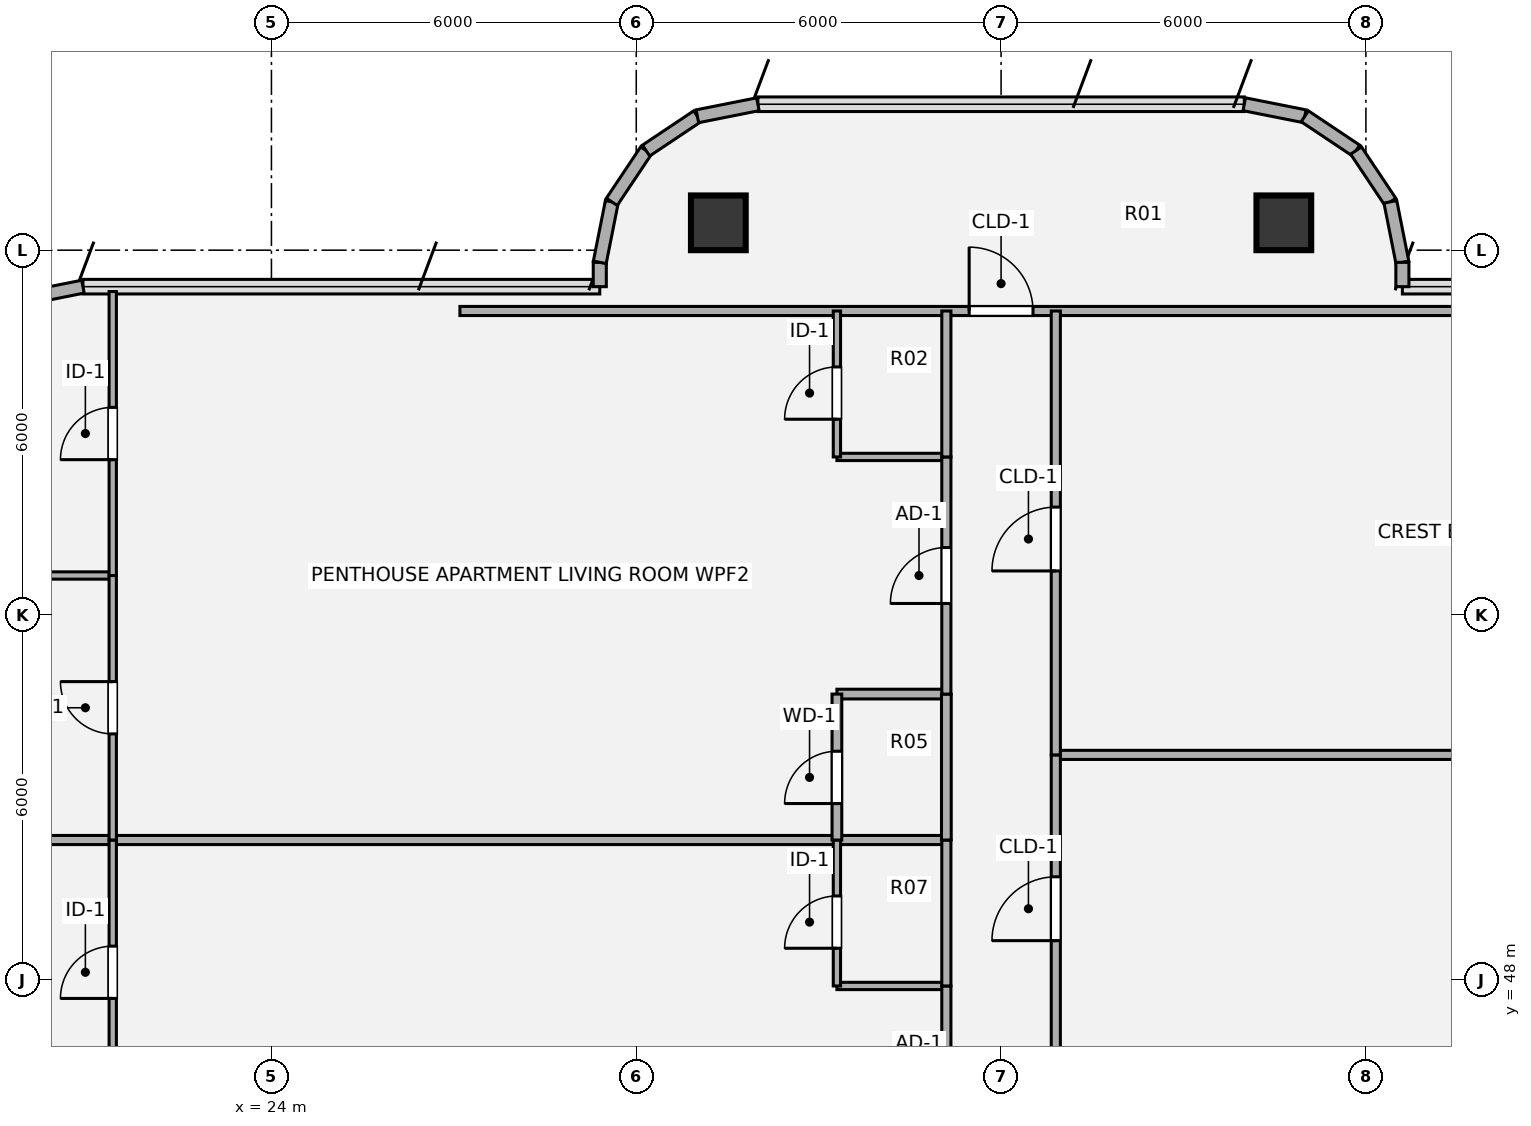
"""IFC4 building model, lengths in metres.
Left out: names, types, materials, properties, quantities, classifications, styles, units other than length and angle.
Written with IfcOpenShell. Run it as: python <this file> out.ifc"""

import sys

from ifc_helpers import new_model, si_unit, direction, frame, frame_2d, origin, origin_2d, place, context, subcontext, project, spatial, rectangle, hollow_circle, extrude, source, transform, mapped, element, fill, save


model = new_model("IFC4")
c1 = context("Model", 3, precision=1e-05, world=origin(), true_north=direction((0.0, 1.0)))
c2 = subcontext(c1, "Body", "Model", "MODEL_VIEW")
j1 = project(units=[si_unit("LENGTHUNIT", "METRE"), si_unit("PLANEANGLEUNIT", "RADIAN")], contexts=[c1])
p1 = place(None, origin())
s1 = spatial("IfcSite", under=j1, at=p1, CompositionType="ELEMENT")
p2 = place(p1, origin())
s2 = spatial("IfcBuilding", under=s1, at=p2, CompositionType="ELEMENT")
p3 = place(p2, frame((0.0, 0.0, 283.5)))
s3 = spatial("IfcBuildingStorey", under=s2, at=p3, CompositionType="ELEMENT", Elevation=283.5)
m1 = source(origin(), c2, "Body", "SweptSolid", [
    extrude(hollow_circle(Radius=0.45, WallThickness=0.032, at=origin_2d()), origin(), (0.0, 0.0, 1.0), 3.78),
])
for number, where, z_axis, x_axis in (
    (1, (31.35, 60.45, 0.0), (0.0, 0.0, 1.0), (1.0, 0.0, 0.0)),
    (2, (40.65, 60.45, 0.0), (0.0, 0.0, 1.0), (1.0, 0.0, 0.0)),
):
    element("IfcColumn", number, at=place(p3, frame(where, z_axis=z_axis, x_axis=x_axis)), inside=s3, PredefinedType="COLUMN", context=c2, shape_type="MappedRepresentation", body=[
        mapped(m1, transform((0.0, 0.0, 0.0), x_axis=(1.0, 0.0, 0.0), y_axis=(0.0, 1.0, 0.0), z_axis=(0.0, 0.0, 1.0), scale=1.0)),
    ])
p4 = place(p3, frame((19.675, 59.156, 0.0), z_axis=(0.0, 0.0, 1.0), x_axis=(0.980813122964, 0.194950295773, 0.0)))
e3 = element("IfcWall", 3, at=p4, inside=s3, PredefinedType="SOLIDWALL", context=c2, shape_type="SweptSolid", body=[
    extrude(rectangle(XDim=1.249, YDim=0.215, at=frame_2d((0.624, 0.0))), origin(), (0.0, 0.0, 1.0), 3.53),
])
p5 = place(p3, frame((29.4, 59.4, 0.0), z_axis=(0.0, 0.0, 1.0), x_axis=(0.0, 1.0, 0.0)))
e4 = element("IfcWall", 4, at=p5, inside=s3, PredefinedType="SOLIDWALL", context=c2, shape_type="SweptSolid", body=[
    extrude(rectangle(XDim=0.4, YDim=0.215, at=frame_2d((0.2, 0.0))), origin(), (0.0, 0.0, 1.0), 3.53),
])
p6 = place(p3, frame((29.4, 59.8, 0.0), z_axis=(0.0, 0.0, 1.0), x_axis=(0.195190360752, 0.980765376158, 0.0)))
e5 = element("IfcWall", 5, at=p6, inside=s3, PredefinedType="SOLIDWALL", context=c2, shape_type="SweptSolid", body=[
    extrude(rectangle(XDim=1.014, YDim=0.215, at=frame_2d((0.507, 0.0))), origin(), (0.0, 0.0, 1.0), 3.53),
])
p7 = place(p3, frame((29.598, 60.795, 0.0), z_axis=(0.0, 0.0, 1.0), x_axis=(0.555643898837, 0.831420385657, 0.0)))
e6 = element("IfcWall", 6, at=p7, inside=s3, PredefinedType="SOLIDWALL", context=c2, shape_type="SweptSolid", body=[
    extrude(rectangle(XDim=1.015, YDim=0.215, at=frame_2d((0.507, 0.0))), origin(), (0.0, 0.0, 1.0), 3.53),
])
p8 = place(p3, frame((30.162, 61.638, 0.0), z_axis=(0.0, 0.0, 1.0), x_axis=(0.831346067305, 0.555755086685, 0.0)))
e7 = element("IfcWall", 7, at=p8, inside=s3, PredefinedType="SOLIDWALL", context=c2, shape_type="SweptSolid", body=[
    extrude(rectangle(XDim=1.014, YDim=0.215, at=frame_2d((0.507, 0.0))), origin(), (0.0, 0.0, 1.0), 3.53),
])
for number, where, z_axis, x_axis in (
    (8, (31.005, 62.202, 0.0), (0.0, 0.0, 1.0), (0.981, 0.195, 0.0)),
    (9, (40.0, 62.4, 0.0), (0.0, 0.0, 1.0), (0.981, -0.195, 0.0)),
):
    element("IfcWall", number, at=place(p3, frame(where, z_axis=z_axis, x_axis=x_axis)), inside=s3, PredefinedType="SOLIDWALL", context=c2, shape_type="SweptSolid", body=[
        extrude(rectangle(XDim=1.015, YDim=0.215, at=frame_2d((0.507, 0.0))), origin(), (0.0, 0.0, 1.0), 3.53),
    ])
p9 = place(p3, frame((40.995, 62.202, 0.0), z_axis=(0.0, 0.0, 1.0), x_axis=(0.831346067305, -0.555755086685, 0.0)))
e10 = element("IfcWall", 10, at=p9, inside=s3, PredefinedType="SOLIDWALL", context=c2, shape_type="SweptSolid", body=[
    extrude(rectangle(XDim=1.014, YDim=0.215, at=frame_2d((0.507, 0.0))), origin(), (0.0, 0.0, 1.0), 3.53),
])
p10 = place(p3, frame((41.838, 61.638, 0.0), z_axis=(0.0, 0.0, 1.0), x_axis=(0.555643898837, -0.831420385657, 0.0)))
e11 = element("IfcWall", 11, at=p10, inside=s3, PredefinedType="SOLIDWALL", context=c2, shape_type="SweptSolid", body=[
    extrude(rectangle(XDim=1.015, YDim=0.215, at=frame_2d((0.507, 0.0))), origin(), (0.0, 0.0, 1.0), 3.53),
])
p11 = place(p3, frame((42.402, 60.795, 0.0), z_axis=(0.0, 0.0, 1.0), x_axis=(0.195190360752, -0.980765376158, 0.0)))
e12 = element("IfcWall", 12, at=p11, inside=s3, PredefinedType="SOLIDWALL", context=c2, shape_type="SweptSolid", body=[
    extrude(rectangle(XDim=1.014, YDim=0.215, at=frame_2d((0.507, 0.0))), origin(), (0.0, 0.0, 1.0), 3.53),
])
p12 = place(p3, frame((42.6, 59.8, 0.0), z_axis=(0.0, 0.0, 1.0), x_axis=(0.0, -1.0, 0.0)))
e13 = element("IfcWall", 13, at=p12, inside=s3, PredefinedType="SOLIDWALL", context=c2, shape_type="SweptSolid", body=[
    extrude(rectangle(XDim=0.4, YDim=0.215, at=frame_2d((0.2, 0.0))), origin(), (0.0, 0.0, 1.0), 3.53),
])
p13 = place(p3, frame((33.3, 47.9, 0.0), z_axis=(0.0, 0.0, 1.0), x_axis=(1.0, 0.0, 0.0)))
e14 = element("IfcWall", 14, at=p13, inside=s3, PredefinedType="PARTITIONING", context=c2, shape_type="SweptSolid", body=[
    extrude(rectangle(XDim=1.8, YDim=0.12, at=frame_2d((0.9, 0.0))), origin(), (0.0, 0.0, 1.0), 3.259),
])
p14 = place(p3, frame((17.78, 50.3, 0.0), z_axis=(0.0, 0.0, 1.0), x_axis=(1.0, 0.0, 0.0)))
e15 = element("IfcWall", 15, at=p14, inside=s3, PredefinedType="PARTITIONING", context=c2, shape_type="SweptSolid", body=[
    extrude(rectangle(XDim=17.32, YDim=0.15, at=frame_2d((8.66, 0.0))), origin(), (0.0, 0.0, 1.0), 2.982),
])
p15 = place(p3, frame((36.9, 51.7, 0.0), z_axis=(0.0, 0.0, 1.0), x_axis=(1.0, 0.0, 0.0)))
e16 = element("IfcWall", 16, at=p15, inside=s3, PredefinedType="PARTITIONING", context=c2, shape_type="SweptSolid", body=[
    extrude(rectangle(XDim=17.32, YDim=0.15, at=frame_2d((8.66, 0.0))), origin(), (0.0, 0.0, 1.0), 3.055),
])
p16 = place(p3, frame((33.3, 52.7, 0.0), z_axis=(0.0, 0.0, 1.0), x_axis=(1.0, 0.0, 0.0)))
e17 = element("IfcWall", 17, at=p16, inside=s3, PredefinedType="PLUMBINGWALL", context=c2, shape_type="SweptSolid", body=[
    extrude(rectangle(XDim=1.8, YDim=0.16, at=frame_2d((0.9, 0.0))), origin(), (0.0, 0.0, 1.0), 3.259),
])
p17 = place(p3, frame((17.78, 54.65, 0.0), z_axis=(0.0, 0.0, 1.0), x_axis=(1.0, 0.0, 0.0)))
e18 = element("IfcWall", 18, at=p17, inside=s3, PredefinedType="PARTITIONING", context=c2, shape_type="SweptSolid", body=[
    extrude(rectangle(XDim=3.61, YDim=0.12, at=frame_2d((1.805, 0.0))), origin(), (0.0, 0.0, 1.0), 2.903),
])
p18 = place(p3, frame((33.3, 56.6, 0.0), z_axis=(0.0, 0.0, 1.0), x_axis=(1.0, 0.0, 0.0)))
e19 = element("IfcWall", 19, at=p18, inside=s3, PredefinedType="PARTITIONING", context=c2, shape_type="SweptSolid", body=[
    extrude(rectangle(XDim=1.8, YDim=0.12, at=frame_2d((0.9, 0.0))), origin(), (0.0, 0.0, 1.0), 3.259),
])
p19 = place(p3, frame((27.1, 59.0, 0.0), z_axis=(0.0, 0.0, 1.0), x_axis=(1.0, 0.0, 0.0)))
e20 = element("IfcWall", 20, at=p19, inside=s3, PredefinedType="PARTITIONING", context=c2, shape_type="SweptSolid", body=[
    extrude(rectangle(XDim=17.8, YDim=0.15, at=frame_2d((8.9, 0.0))), origin(), (0.0, 0.0, 1.0), 3.308),
])
p20 = place(p19, frame((8.375, 0.0, 0.0)))
e21 = element("IfcOpeningElement", 21, at=p20, cuts=e20, PredefinedType="OPENING", context=c2, shape_type="SweptSolid", body=[
    extrude(rectangle(XDim=1.05, YDim=2.1, at=origin_2d()), frame((0.525, 0.085, 1.05), z_axis=(0.0, -1.0, 0.0), x_axis=(1.0, 0.0, 0.0)), (0.0, 0.0, 1.0), 0.17),
])
p21 = place(p3, frame((21.39, 45.95, 0.0), z_axis=(0.0, 0.0, 1.0), x_axis=(0.0, 1.0, 0.0)))
e22 = element("IfcWall", 22, at=p21, inside=s3, PredefinedType="PARTITIONING", context=c2, shape_type="SweptSolid", body=[
    extrude(rectangle(XDim=4.35, YDim=0.12, at=frame_2d((2.175, 0.0))), origin(), (0.0, 0.0, 1.0), 3.5),
])
p22 = place(p21, frame((1.745, 0.0, 0.0)))
e23 = element("IfcOpeningElement", 23, at=p22, cuts=e22, PredefinedType="OPENING", context=c2, shape_type="SweptSolid", body=[
    extrude(rectangle(XDim=0.86, YDim=2.1, at=origin_2d()), frame((0.43, 0.07, 1.05), z_axis=(0.0, -1.0, 0.0), x_axis=(1.0, 0.0, 0.0)), (0.0, 0.0, 1.0), 0.14),
])
p23 = place(p3, frame((21.39, 50.3, 0.0), z_axis=(0.0, 0.0, 1.0), x_axis=(0.0, 1.0, 0.0)))
e24 = element("IfcWall", 24, at=p23, inside=s3, PredefinedType="PARTITIONING", context=c2, shape_type="SweptSolid", body=[
    extrude(rectangle(XDim=4.35, YDim=0.12, at=frame_2d((2.175, 0.0))), origin(), (0.0, 0.0, 1.0), 3.5),
])
p24 = place(p23, frame((1.745, 0.0, 0.0)))
e25 = element("IfcOpeningElement", 25, at=p24, cuts=e24, PredefinedType="OPENING", context=c2, shape_type="SweptSolid", body=[
    extrude(rectangle(XDim=0.86, YDim=2.1, at=origin_2d()), frame((0.43, 0.07, 1.05), z_axis=(0.0, -1.0, 0.0), x_axis=(1.0, 0.0, 0.0)), (0.0, 0.0, 1.0), 0.14),
])
p25 = place(p3, frame((21.39, 54.65, 0.0), z_axis=(0.0, 0.0, 1.0), x_axis=(0.0, 1.0, 0.0)))
e26 = element("IfcWall", 26, at=p25, inside=s3, PredefinedType="PARTITIONING", context=c2, shape_type="SweptSolid", body=[
    extrude(rectangle(XDim=4.67, YDim=0.12, at=frame_2d((2.335, 0.0))), origin(), (0.0, 0.0, 1.0), 3.5),
])
p26 = place(p25, frame((1.905, 0.0, 0.0)))
e27 = element("IfcOpeningElement", 27, at=p26, cuts=e26, PredefinedType="OPENING", context=c2, shape_type="SweptSolid", body=[
    extrude(rectangle(XDim=0.86, YDim=2.1, at=origin_2d()), frame((0.43, 0.07, 1.05), z_axis=(0.0, -1.0, 0.0), x_axis=(1.0, 0.0, 0.0)), (0.0, 0.0, 1.0), 0.14),
])
p27 = place(p3, frame((33.3, 47.9, 0.0), z_axis=(0.0, 0.0, 1.0), x_axis=(0.0, 1.0, 0.0)))
e28 = element("IfcWall", 28, at=p27, inside=s3, PredefinedType="PARTITIONING", context=c2, shape_type="SweptSolid", body=[
    extrude(rectangle(XDim=2.4, YDim=0.12, at=frame_2d((1.2, 0.0))), origin(), (0.0, 0.0, 1.0), 3.5),
])
p28 = place(p27, frame((0.62, 0.0, 0.0)))
e29 = element("IfcOpeningElement", 29, at=p28, cuts=e28, PredefinedType="OPENING", context=c2, shape_type="SweptSolid", body=[
    extrude(rectangle(XDim=0.86, YDim=2.1, at=origin_2d()), frame((0.43, 0.07, 1.05), z_axis=(0.0, -1.0, 0.0), x_axis=(1.0, 0.0, 0.0)), (0.0, 0.0, 1.0), 0.14),
])
p29 = place(p3, frame((33.3, 50.3, 0.0), z_axis=(0.0, 0.0, 1.0), x_axis=(0.0, 1.0, 0.0)))
e30 = element("IfcWall", 30, at=p29, inside=s3, PredefinedType="PLUMBINGWALL", context=c2, shape_type="SweptSolid", body=[
    extrude(rectangle(XDim=2.4, YDim=0.16, at=frame_2d((1.2, 0.0))), origin(), (0.0, 0.0, 1.0), 3.5),
])
p30 = place(p29, frame((0.6, 0.0, 0.0)))
e31 = element("IfcOpeningElement", 31, at=p30, cuts=e30, PredefinedType="OPENING", context=c2, shape_type="SweptSolid", body=[
    extrude(rectangle(XDim=0.86, YDim=2.1, at=origin_2d()), frame((0.43, 0.09, 1.05), z_axis=(0.0, -1.0, 0.0), x_axis=(1.0, 0.0, 0.0)), (0.0, 0.0, 1.0), 0.18),
])
p31 = place(p3, frame((33.3, 56.6, 0.0), z_axis=(0.0, 0.0, 1.0), x_axis=(0.0, 1.0, 0.0)))
e32 = element("IfcWall", 32, at=p31, inside=s3, PredefinedType="PARTITIONING", context=c2, shape_type="SweptSolid", body=[
    extrude(rectangle(XDim=2.4, YDim=0.12, at=frame_2d((1.2, 0.0))), origin(), (0.0, 0.0, 1.0), 3.5),
])
p32 = place(p31, frame((0.62, 0.0, 0.0)))
e33 = element("IfcOpeningElement", 33, at=p32, cuts=e32, PredefinedType="OPENING", context=c2, shape_type="SweptSolid", body=[
    extrude(rectangle(XDim=0.86, YDim=2.1, at=origin_2d()), frame((0.43, 0.07, 1.05), z_axis=(0.0, -1.0, 0.0), x_axis=(1.0, 0.0, 0.0)), (0.0, 0.0, 1.0), 0.14),
])
p33 = place(p3, frame((35.1, 44.0, 0.0), z_axis=(0.0, 0.0, 1.0), x_axis=(0.0, 1.0, 0.0)))
e34 = element("IfcWall", 34, at=p33, inside=s3, PredefinedType="PARTITIONING", context=c2, shape_type="SweptSolid", body=[
    extrude(rectangle(XDim=3.9, YDim=0.15, at=frame_2d((1.95, 0.0))), origin(), (0.0, 0.0, 1.0), 3.5),
])
p34 = place(p33, frame((1.49, 0.0, 0.0)))
e35 = element("IfcOpeningElement", 35, at=p34, cuts=e34, PredefinedType="OPENING", context=c2, shape_type="SweptSolid", body=[
    extrude(rectangle(XDim=0.92, YDim=2.1, at=origin_2d()), frame((0.46, 0.085, 1.05), z_axis=(0.0, -1.0, 0.0), x_axis=(1.0, 0.0, 0.0)), (0.0, 0.0, 1.0), 0.17),
])
p35 = place(p3, frame((35.1, 47.9, 0.0), z_axis=(0.0, 0.0, 1.0), x_axis=(0.0, 1.0, 0.0)))
e36 = element("IfcWall", 36, at=p35, inside=s3, PredefinedType="PARTITIONING", context=c2, shape_type="SweptSolid", body=[
    extrude(rectangle(XDim=2.4, YDim=0.15, at=frame_2d((1.2, 0.0))), origin(), (0.0, 0.0, 1.0), 3.5),
])
p36 = place(p3, frame((35.1, 50.3, 0.0), z_axis=(0.0, 0.0, 1.0), x_axis=(0.0, 1.0, 0.0)))
e37 = element("IfcWall", 37, at=p36, inside=s3, PredefinedType="PLUMBINGWALL", context=c2, shape_type="SweptSolid", body=[
    extrude(rectangle(XDim=2.4, YDim=0.16, at=frame_2d((1.2, 0.0))), origin(), (0.0, 0.0, 1.0), 3.5),
])
p37 = place(p3, frame((35.1, 52.7, 0.0), z_axis=(0.0, 0.0, 1.0), x_axis=(0.0, 1.0, 0.0)))
e38 = element("IfcWall", 38, at=p37, inside=s3, PredefinedType="PARTITIONING", context=c2, shape_type="SweptSolid", body=[
    extrude(rectangle(XDim=3.9, YDim=0.15, at=frame_2d((1.95, 0.0))), origin(), (0.0, 0.0, 1.0), 3.5),
])
p38 = place(p37, frame((1.49, 0.0, 0.0)))
e39 = element("IfcOpeningElement", 39, at=p38, cuts=e38, PredefinedType="OPENING", context=c2, shape_type="SweptSolid", body=[
    extrude(rectangle(XDim=0.92, YDim=2.1, at=origin_2d()), frame((0.46, 0.085, 1.05), z_axis=(0.0, -1.0, 0.0), x_axis=(1.0, 0.0, 0.0)), (0.0, 0.0, 1.0), 0.17),
])
p39 = place(p3, frame((35.1, 56.6, 0.0), z_axis=(0.0, 0.0, 1.0), x_axis=(0.0, 1.0, 0.0)))
e40 = element("IfcWall", 40, at=p39, inside=s3, PredefinedType="PARTITIONING", context=c2, shape_type="SweptSolid", body=[
    extrude(rectangle(XDim=2.4, YDim=0.15, at=frame_2d((1.2, 0.0))), origin(), (0.0, 0.0, 1.0), 3.5),
])
p40 = place(p3, frame((36.9, 41.6, 0.0), z_axis=(0.0, 0.0, 1.0), x_axis=(0.0, 1.0, 0.0)))
e41 = element("IfcWall", 41, at=p40, inside=s3, PredefinedType="PARTITIONING", context=c2, shape_type="SweptSolid", body=[
    extrude(rectangle(XDim=10.1, YDim=0.15, at=frame_2d((5.05, 0.0))), origin(), (0.0, 0.0, 1.0), 3.5),
])
p41 = place(p40, frame((7.045, 0.0, 0.0)))
e42 = element("IfcOpeningElement", 42, at=p41, cuts=e41, PredefinedType="OPENING", context=c2, shape_type="SweptSolid", body=[
    extrude(rectangle(XDim=1.05, YDim=2.1, at=origin_2d()), frame((0.525, 0.085, 1.05), z_axis=(0.0, -1.0, 0.0), x_axis=(1.0, 0.0, 0.0)), (0.0, 0.0, 1.0), 0.17),
])
p42 = place(p3, frame((36.9, 51.7, 0.0), z_axis=(0.0, 0.0, 1.0), x_axis=(0.0, 1.0, 0.0)))
e43 = element("IfcWall", 43, at=p42, inside=s3, PredefinedType="PARTITIONING", context=c2, shape_type="SweptSolid", body=[
    extrude(rectangle(XDim=7.3, YDim=0.15, at=frame_2d((3.65, 0.0))), origin(), (0.0, 0.0, 1.0), 3.5),
])
p43 = place(p42, frame((3.025, 0.0, 0.0)))
e44 = element("IfcOpeningElement", 44, at=p43, cuts=e43, PredefinedType="OPENING", context=c2, shape_type="SweptSolid", body=[
    extrude(rectangle(XDim=1.05, YDim=2.1, at=origin_2d()), frame((0.525, 0.085, 1.05), z_axis=(0.0, -1.0, 0.0), x_axis=(1.0, 0.0, 0.0)), (0.0, 0.0, 1.0), 0.17),
])
m2 = source(origin(), c2, "Body", "SweptSolid", [
    extrude(rectangle(XDim=1.05, YDim=2.1, at=origin_2d()), frame((0.525, 0.025, 1.05), z_axis=(0.0, -1.0, 0.0), x_axis=(1.0, 0.0, 0.0)), (0.0, 0.0, 1.0), 0.05),
])
p44 = place(p20, origin())
e45 = element("IfcDoor", 45, at=p44, inside=s3, OperationType="SINGLE_SWING_LEFT", PredefinedType="DOOR", context=c2, shape_type="MappedRepresentation", body=[
    mapped(m2, transform((0.0, 0.0, 0.0), x_axis=(1.0, 0.0, 0.0), y_axis=(0.0, 1.0, 0.0), z_axis=(0.0, 0.0, 1.0), scale=1.0)),
])
fill(e21, e45)
m3 = source(origin(), c2, "Body", "SweptSolid", [
    extrude(rectangle(XDim=0.86, YDim=2.1, at=origin_2d()), frame((0.43, 0.025, 1.05), z_axis=(0.0, -1.0, 0.0), x_axis=(1.0, 0.0, 0.0)), (0.0, 0.0, 1.0), 0.05),
])
p45 = place(p22, origin())
e46 = element("IfcDoor", 46, at=p45, inside=s3, OperationType="SINGLE_SWING_LEFT", PredefinedType="DOOR", context=c2, shape_type="MappedRepresentation", body=[
    mapped(m3, transform((0.0, 0.0, 0.0), x_axis=(1.0, 0.0, 0.0), y_axis=(0.0, 1.0, 0.0), z_axis=(0.0, 0.0, 1.0), scale=1.0)),
])
fill(e23, e46)
p46 = place(p24, origin())
e47 = element("IfcDoor", 47, at=p46, inside=s3, OperationType="SINGLE_SWING_RIGHT", PredefinedType="DOOR", context=c2, shape_type="MappedRepresentation", body=[
    mapped(m3, transform((0.0, 0.0, 0.0), x_axis=(1.0, 0.0, 0.0), y_axis=(0.0, 1.0, 0.0), z_axis=(0.0, 0.0, 1.0), scale=1.0)),
])
fill(e25, e47)
p47 = place(p26, origin())
e48 = element("IfcDoor", 48, at=p47, inside=s3, OperationType="SINGLE_SWING_LEFT", PredefinedType="DOOR", context=c2, shape_type="MappedRepresentation", body=[
    mapped(m3, transform((0.0, 0.0, 0.0), x_axis=(1.0, 0.0, 0.0), y_axis=(0.0, 1.0, 0.0), z_axis=(0.0, 0.0, 1.0), scale=1.0)),
])
fill(e27, e48)
p48 = place(p28, origin())
e49 = element("IfcDoor", 49, at=p48, inside=s3, OperationType="SINGLE_SWING_LEFT", PredefinedType="DOOR", context=c2, shape_type="MappedRepresentation", body=[
    mapped(m3, transform((0.0, 0.0, 0.0), x_axis=(1.0, 0.0, 0.0), y_axis=(0.0, 1.0, 0.0), z_axis=(0.0, 0.0, 1.0), scale=1.0)),
])
fill(e29, e49)
m4 = source(origin(), c2, "Body", "SweptSolid", [
    extrude(rectangle(XDim=0.86, YDim=2.1, at=origin_2d()), frame((0.43, 0.025, 1.05), z_axis=(0.0, -1.0, 0.0), x_axis=(1.0, 0.0, 0.0)), (0.0, 0.0, 1.0), 0.05),
])
p49 = place(p30, origin())
e50 = element("IfcDoor", 50, at=p49, inside=s3, OperationType="SINGLE_SWING_LEFT", PredefinedType="DOOR", context=c2, shape_type="MappedRepresentation", body=[
    mapped(m4, transform((0.0, 0.0, 0.0), x_axis=(1.0, 0.0, 0.0), y_axis=(0.0, 1.0, 0.0), z_axis=(0.0, 0.0, 1.0), scale=1.0)),
])
fill(e31, e50)
p50 = place(p32, origin())
e51 = element("IfcDoor", 51, at=p50, inside=s3, OperationType="SINGLE_SWING_LEFT", PredefinedType="DOOR", context=c2, shape_type="MappedRepresentation", body=[
    mapped(m3, transform((0.0, 0.0, 0.0), x_axis=(1.0, 0.0, 0.0), y_axis=(0.0, 1.0, 0.0), z_axis=(0.0, 0.0, 1.0), scale=1.0)),
])
fill(e33, e51)
m5 = source(origin(), c2, "Body", "SweptSolid", [
    extrude(rectangle(XDim=0.92, YDim=2.1, at=origin_2d()), frame((0.46, 0.025, 1.05), z_axis=(0.0, -1.0, 0.0), x_axis=(1.0, 0.0, 0.0)), (0.0, 0.0, 1.0), 0.05),
])
p51 = place(p38, origin())
e52 = element("IfcDoor", 52, at=p51, inside=s3, OperationType="SINGLE_SWING_LEFT", PredefinedType="DOOR", context=c2, shape_type="MappedRepresentation", body=[
    mapped(m5, transform((0.0, 0.0, 0.0), x_axis=(1.0, 0.0, 0.0), y_axis=(0.0, 1.0, 0.0), z_axis=(0.0, 0.0, 1.0), scale=1.0)),
])
fill(e39, e52)
p52 = place(p41, origin())
e53 = element("IfcDoor", 53, at=p52, inside=s3, OperationType="SINGLE_SWING_LEFT", PredefinedType="DOOR", context=c2, shape_type="MappedRepresentation", body=[
    mapped(m2, transform((0.0, 0.0, 0.0), x_axis=(1.0, 0.0, 0.0), y_axis=(0.0, 1.0, 0.0), z_axis=(0.0, 0.0, 1.0), scale=1.0)),
])
fill(e42, e53)
p53 = place(p43, origin())
e54 = element("IfcDoor", 54, at=p53, inside=s3, OperationType="SINGLE_SWING_LEFT", PredefinedType="DOOR", context=c2, shape_type="MappedRepresentation", body=[
    mapped(m2, transform((0.0, 0.0, 0.0), x_axis=(1.0, 0.0, 0.0), y_axis=(0.0, 1.0, 0.0), z_axis=(0.0, 0.0, 1.0), scale=1.0)),
])
fill(e44, e54)
save(model, sys.argv[1])
